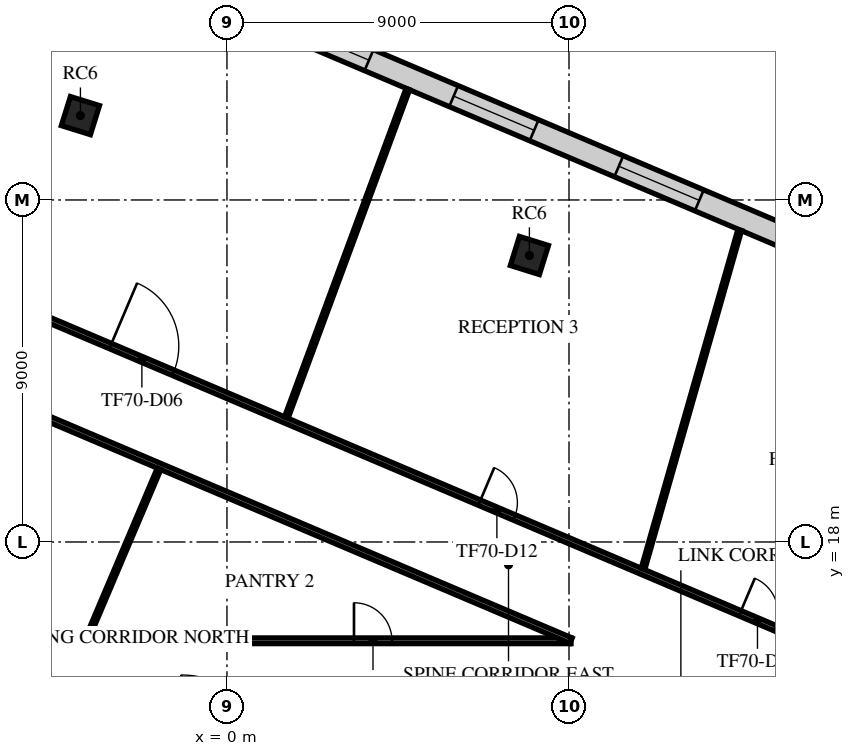
"""IFC4 building model, lengths in metres.
Left out: names, types, materials, properties, quantities, classifications, styles, units other than length and angle.
Written with IfcOpenShell. Run it as: python <this file> out.ifc"""

import sys

from ifc_helpers import new_model, si_unit, direction, frame, frame_2d, origin, origin_2d, place, context, subcontext, project, spatial, rectangle, extrude, element, fill, save


model = new_model("IFC4")
c1 = context("Model", 3, precision=1e-05, world=origin(), true_north=direction((0.0, 1.0)))
c2 = subcontext(c1, "Body", "Model", "MODEL_VIEW")
j1 = project(units=[si_unit("LENGTHUNIT", "METRE"), si_unit("PLANEANGLEUNIT", "RADIAN")], contexts=[c1])
p1 = place(None, origin())
s1 = spatial("IfcSite", under=j1, at=p1, CompositionType="ELEMENT")
p2 = place(p1, origin())
s2 = spatial("IfcBuilding", under=s1, at=p2, CompositionType="ELEMENT")
p3 = place(p2, frame((0.0, 0.0, 296.5)))
s3 = spatial("IfcBuildingStorey", under=s2, at=p3, CompositionType="ELEMENT", Elevation=296.5)
for number, where, z_axis, x_axis in (
    (1, (7.958, 25.539, -0.35), (0.0, 0.0, 1.0), (0.298, 0.955, 0.0)),
    (2, (-3.856, 29.22, -0.35), (0.0, 0.0, 1.0), (0.298, 0.955, 0.0)),
):
    element("IfcColumn", number, at=place(p3, frame(where, z_axis=z_axis, x_axis=x_axis)), inside=s3, PredefinedType="COLUMN", context=c2, shape_type="SweptSolid", body=[
        extrude(rectangle(XDim=0.8, YDim=0.8, at=origin_2d()), origin(), (0.0, 0.0, 1.0), 4.35),
    ])
p4 = place(p3, frame((30.926, 19.138, 0.0), z_axis=(0.0, 0.0, 1.0), x_axis=(-0.920504263443, 0.390732518462, 0.0)))
e3 = element("IfcWall", 3, at=p4, inside=s3, PredefinedType="STANDARD", context=c2, shape_type="SweptSolid", body=[
    extrude(rectangle(XDim=42.49, YDim=0.6, at=frame_2d((21.245, 0.0))), origin(), (0.0, 0.0, 1.0), 3.65),
])
p5 = place(p4, frame((1.21, 0.0, 0.9)))
e4 = element("IfcOpeningElement", 4, at=p5, cuts=e3, PredefinedType="OPENING", context=c2, shape_type="SweptSolid", body=[
    extrude(rectangle(XDim=2.3, YDim=2.1, at=frame_2d((1.15, 1.05))), frame((0.0, 0.31, 0.0), z_axis=(0.0, -1.0, 0.0), x_axis=(1.0, 0.0, 0.0)), (0.0, 0.0, 1.0), 0.62),
])
p6 = place(p4, frame((5.932, 0.0, 0.9)))
e5 = element("IfcOpeningElement", 5, at=p6, cuts=e3, PredefinedType="OPENING", context=c2, shape_type="SweptSolid", body=[
    extrude(rectangle(XDim=2.3, YDim=2.1, at=frame_2d((1.15, 1.05))), frame((0.0, 0.31, 0.0), z_axis=(0.0, -1.0, 0.0), x_axis=(1.0, 0.0, 0.0)), (0.0, 0.0, 1.0), 0.62),
])
p7 = place(p4, frame((10.653, 0.0, 0.9)))
e6 = element("IfcOpeningElement", 6, at=p7, cuts=e3, PredefinedType="OPENING", context=c2, shape_type="SweptSolid", body=[
    extrude(rectangle(XDim=2.3, YDim=2.1, at=frame_2d((1.15, 1.05))), frame((0.0, 0.31, 0.0), z_axis=(0.0, -1.0, 0.0), x_axis=(1.0, 0.0, 0.0)), (0.0, 0.0, 1.0), 0.62),
])
p8 = place(p4, frame((15.374, 0.0, 0.9)))
e7 = element("IfcOpeningElement", 7, at=p8, cuts=e3, PredefinedType="OPENING", context=c2, shape_type="SweptSolid", body=[
    extrude(rectangle(XDim=2.3, YDim=2.1, at=frame_2d((1.15, 1.05))), frame((0.0, 0.31, 0.0), z_axis=(0.0, -1.0, 0.0), x_axis=(1.0, 0.0, 0.0)), (0.0, 0.0, 1.0), 0.62),
])
p9 = place(p4, frame((20.095, 0.0, 0.9)))
e8 = element("IfcOpeningElement", 8, at=p9, cuts=e3, PredefinedType="OPENING", context=c2, shape_type="SweptSolid", body=[
    extrude(rectangle(XDim=2.3, YDim=2.1, at=frame_2d((1.15, 1.05))), frame((0.0, 0.31, 0.0), z_axis=(0.0, -1.0, 0.0), x_axis=(1.0, 0.0, 0.0)), (0.0, 0.0, 1.0), 0.62),
])
p10 = place(p4, frame((24.816, 0.0, 0.9)))
e9 = element("IfcOpeningElement", 9, at=p10, cuts=e3, PredefinedType="OPENING", context=c2, shape_type="SweptSolid", body=[
    extrude(rectangle(XDim=2.3, YDim=2.1, at=frame_2d((1.15, 1.05))), frame((0.0, 0.31, 0.0), z_axis=(0.0, -1.0, 0.0), x_axis=(1.0, 0.0, 0.0)), (0.0, 0.0, 1.0), 0.62),
])
p11 = place(p4, frame((29.537, 0.0, 0.9)))
e10 = element("IfcOpeningElement", 10, at=p11, cuts=e3, PredefinedType="OPENING", context=c2, shape_type="SweptSolid", body=[
    extrude(rectangle(XDim=2.3, YDim=2.1, at=frame_2d((1.15, 1.05))), frame((0.0, 0.31, 0.0), z_axis=(0.0, -1.0, 0.0), x_axis=(1.0, 0.0, 0.0)), (0.0, 0.0, 1.0), 0.62),
])
p12 = place(p4, frame((34.258, 0.0, 0.9)))
e11 = element("IfcOpeningElement", 11, at=p12, cuts=e3, PredefinedType="OPENING", context=c2, shape_type="SweptSolid", body=[
    extrude(rectangle(XDim=2.3, YDim=2.1, at=frame_2d((1.15, 1.05))), frame((0.0, 0.31, 0.0), z_axis=(0.0, -1.0, 0.0), x_axis=(1.0, 0.0, 0.0)), (0.0, 0.0, 1.0), 0.62),
])
p13 = place(p4, frame((38.979, 0.0, 0.9)))
e12 = element("IfcOpeningElement", 12, at=p13, cuts=e3, PredefinedType="OPENING", context=c2, shape_type="SweptSolid", body=[
    extrude(rectangle(XDim=2.3, YDim=2.1, at=frame_2d((1.15, 1.05))), frame((0.0, 0.31, 0.0), z_axis=(0.0, -1.0, 0.0), x_axis=(1.0, 0.0, 0.0)), (0.0, 0.0, 1.0), 0.62),
])
p14 = place(p3, frame((-15.325, 15.4, 0.0), z_axis=(0.0, 0.0, 1.0), x_axis=(1.0, 0.0, 0.0)))
e13 = element("IfcWall", 13, at=p14, inside=s3, PredefinedType="PARTITIONING", context=c2, shape_type="SweptSolid", body=[
    extrude(rectangle(XDim=24.378, YDim=0.15, at=frame_2d((12.189, 0.0))), origin(), (0.0, 0.0, 1.0), 3.25),
])
p15 = place(p14, frame((18.667, 0.0, 0.0)))
e14 = element("IfcOpeningElement", 14, at=p15, cuts=e13, PredefinedType="OPENING", context=c2, shape_type="SweptSolid", body=[
    extrude(rectangle(XDim=1.0, YDim=2.1, at=frame_2d((0.5, 1.05))), frame((0.0, 0.085, 0.0), z_axis=(0.0, -1.0, 0.0), x_axis=(1.0, 0.0, 0.0)), (0.0, 0.0, 1.0), 0.17),
])
p16 = place(p3, frame((-9.114, 23.116, 0.0), z_axis=(0.0, 0.0, 1.0), x_axis=(0.920508047483, -0.390723603739, 0.0)))
e15 = element("IfcWall", 15, at=p16, inside=s3, PredefinedType="PARTITIONING", context=c2, shape_type="SweptSolid", body=[
    extrude(rectangle(XDim=19.737, YDim=0.15, at=frame_2d((9.868, 0.0))), origin(), (0.0, 0.0, 1.0), 3.25),
])
p17 = place(p3, frame((-8.176, 25.325, 0.0), z_axis=(0.0, 0.0, 1.0), x_axis=(0.920507643781, -0.390724554821, 0.0)))
e16 = element("IfcWall", 16, at=p17, inside=s3, PredefinedType="PARTITIONING", context=c2, shape_type="SweptSolid", body=[
    extrude(rectangle(XDim=34.917, YDim=0.15, at=frame_2d((17.458, 0.0))), origin(), (0.0, 0.0, 1.0), 3.25),
])
p18 = place(p17, frame((5.55, 0.0, 0.0)))
e17 = element("IfcOpeningElement", 17, at=p18, cuts=e16, PredefinedType="OPENING", context=c2, shape_type="SweptSolid", body=[
    extrude(rectangle(XDim=1.8, YDim=2.1, at=frame_2d((0.9, 1.05))), frame((0.0, 0.085, 0.0), z_axis=(0.0, -1.0, 0.0), x_axis=(1.0, 0.0, 0.0)), (0.0, 0.0, 1.0), 0.17),
])
p19 = place(p17, frame((1.05, 0.0, 0.0)))
e18 = element("IfcOpeningElement", 18, at=p19, cuts=e16, PredefinedType="OPENING", context=c2, shape_type="SweptSolid", body=[
    extrude(rectangle(XDim=1.0, YDim=2.1, at=frame_2d((0.5, 1.05))), frame((0.0, 0.085, 0.0), z_axis=(0.0, -1.0, 0.0), x_axis=(1.0, 0.0, 0.0)), (0.0, 0.0, 1.0), 0.17),
])
p20 = place(p17, frame((16.098, 0.0, 0.0)))
e19 = element("IfcOpeningElement", 19, at=p20, cuts=e16, PredefinedType="OPENING", context=c2, shape_type="SweptSolid", body=[
    extrude(rectangle(XDim=1.0, YDim=2.1, at=frame_2d((0.5, 1.05))), frame((0.0, 0.085, 0.0), z_axis=(0.0, -1.0, 0.0), x_axis=(1.0, 0.0, 0.0)), (0.0, 0.0, 1.0), 0.17),
])
p21 = place(p17, frame((23.547, 0.0, 0.0)))
e20 = element("IfcOpeningElement", 20, at=p21, cuts=e16, PredefinedType="OPENING", context=c2, shape_type="SweptSolid", body=[
    extrude(rectangle(XDim=1.0, YDim=2.1, at=frame_2d((0.5, 1.05))), frame((0.0, 0.085, 0.0), z_axis=(0.0, -1.0, 0.0), x_axis=(1.0, 0.0, 0.0)), (0.0, 0.0, 1.0), 0.17),
])
p22 = place(p3, frame((-3.667, 15.494, 0.0), z_axis=(0.0, 0.0, 1.0), x_axis=(0.390616296151, 0.920553588435, 0.0)))
e21 = element("IfcWall", 21, at=p22, inside=s3, PredefinedType="PARTITIONING", context=c2, shape_type="SweptSolid", body=[
    extrude(rectangle(XDim=4.812, YDim=0.1, at=frame_2d((2.406, 0.0))), origin(), (0.0, 0.0, 1.0), 3.25),
])
p23 = place(p3, frame((1.562, 21.276, 0.0), z_axis=(0.0, 0.0, 1.0), x_axis=(0.346967394258, 0.937877192025, 0.0)))
e22 = element("IfcWall", 22, at=p23, inside=s3, PredefinedType="PARTITIONING", context=c2, shape_type="SweptSolid", body=[
    extrude(rectangle(XDim=9.213, YDim=0.1, at=frame_2d((4.607, 0.0))), origin(), (0.0, 0.0, 1.0), 3.25),
])
p24 = place(p3, frame((10.948, 17.296, 0.0), z_axis=(0.0, 0.0, 1.0), x_axis=(0.274428926373, 0.961607385771, 0.0)))
e23 = element("IfcWall", 23, at=p24, inside=s3, PredefinedType="PARTITIONING", context=c2, shape_type="SweptSolid", body=[
    extrude(rectangle(XDim=9.27, YDim=0.1, at=frame_2d((4.635, 0.0))), origin(), (0.0, 0.0, 1.0), 3.65),
])
p25 = place(p9, origin())
e24 = element("IfcWindow", 24, at=p25, inside=s3, PartitioningType="SINGLE_PANEL", PredefinedType="WINDOW", context=c2, shape_type="SweptSolid", body=[
    extrude(rectangle(XDim=2.3, YDim=2.1, at=frame_2d((1.15, 1.05))), frame((0.0, 0.03, 0.0), z_axis=(0.0, -1.0, 0.0), x_axis=(1.0, 0.0, 0.0)), (0.0, 0.0, 1.0), 0.06),
])
fill(e8, e24)
p26 = place(p10, origin())
e25 = element("IfcWindow", 25, at=p26, inside=s3, PartitioningType="SINGLE_PANEL", PredefinedType="WINDOW", context=c2, shape_type="SweptSolid", body=[
    extrude(rectangle(XDim=2.3, YDim=2.1, at=frame_2d((1.15, 1.05))), frame((0.0, 0.03, 0.0), z_axis=(0.0, -1.0, 0.0), x_axis=(1.0, 0.0, 0.0)), (0.0, 0.0, 1.0), 0.06),
])
fill(e9, e25)
p27 = place(p11, origin())
e26 = element("IfcWindow", 26, at=p27, inside=s3, PartitioningType="SINGLE_PANEL", PredefinedType="WINDOW", context=c2, shape_type="SweptSolid", body=[
    extrude(rectangle(XDim=2.3, YDim=2.1, at=frame_2d((1.15, 1.05))), frame((0.0, 0.03, 0.0), z_axis=(0.0, -1.0, 0.0), x_axis=(1.0, 0.0, 0.0)), (0.0, 0.0, 1.0), 0.06),
])
fill(e10, e26)
p28 = place(p18, origin())
e27 = element("IfcDoor", 27, at=p28, inside=s3, OperationType="DOUBLE_DOOR_SINGLE_SWING", PredefinedType="DOOR", context=c2, shape_type="SweptSolid", body=[
    extrude(rectangle(XDim=1.8, YDim=2.1, at=frame_2d((0.9, 1.05))), frame((0.0, 0.025, 0.0), z_axis=(0.0, -1.0, 0.0), x_axis=(1.0, 0.0, 0.0)), (0.0, 0.0, 1.0), 0.05),
])
fill(e17, e27)
p29 = place(p15, origin())
e28 = element("IfcDoor", 28, at=p29, inside=s3, OperationType="SINGLE_SWING_RIGHT", PredefinedType="DOOR", context=c2, shape_type="SweptSolid", body=[
    extrude(rectangle(XDim=1.0, YDim=2.1, at=frame_2d((0.5, 1.05))), frame((0.0, 0.025, 0.0), z_axis=(0.0, -1.0, 0.0), x_axis=(1.0, 0.0, 0.0)), (0.0, 0.0, 1.0), 0.05),
])
fill(e14, e28)
p30 = place(p20, origin())
e29 = element("IfcDoor", 29, at=p30, inside=s3, OperationType="SINGLE_SWING_RIGHT", PredefinedType="DOOR", context=c2, shape_type="SweptSolid", body=[
    extrude(rectangle(XDim=1.0, YDim=2.1, at=frame_2d((0.5, 1.05))), frame((0.0, 0.025, 0.0), z_axis=(0.0, -1.0, 0.0), x_axis=(1.0, 0.0, 0.0)), (0.0, 0.0, 1.0), 0.05),
])
fill(e19, e29)
p31 = place(p21, origin())
e30 = element("IfcDoor", 30, at=p31, inside=s3, OperationType="SINGLE_SWING_RIGHT", PredefinedType="DOOR", context=c2, shape_type="SweptSolid", body=[
    extrude(rectangle(XDim=1.0, YDim=2.1, at=frame_2d((0.5, 1.05))), frame((0.0, 0.025, 0.0), z_axis=(0.0, -1.0, 0.0), x_axis=(1.0, 0.0, 0.0)), (0.0, 0.0, 1.0), 0.05),
])
fill(e20, e30)
save(model, sys.argv[1])
